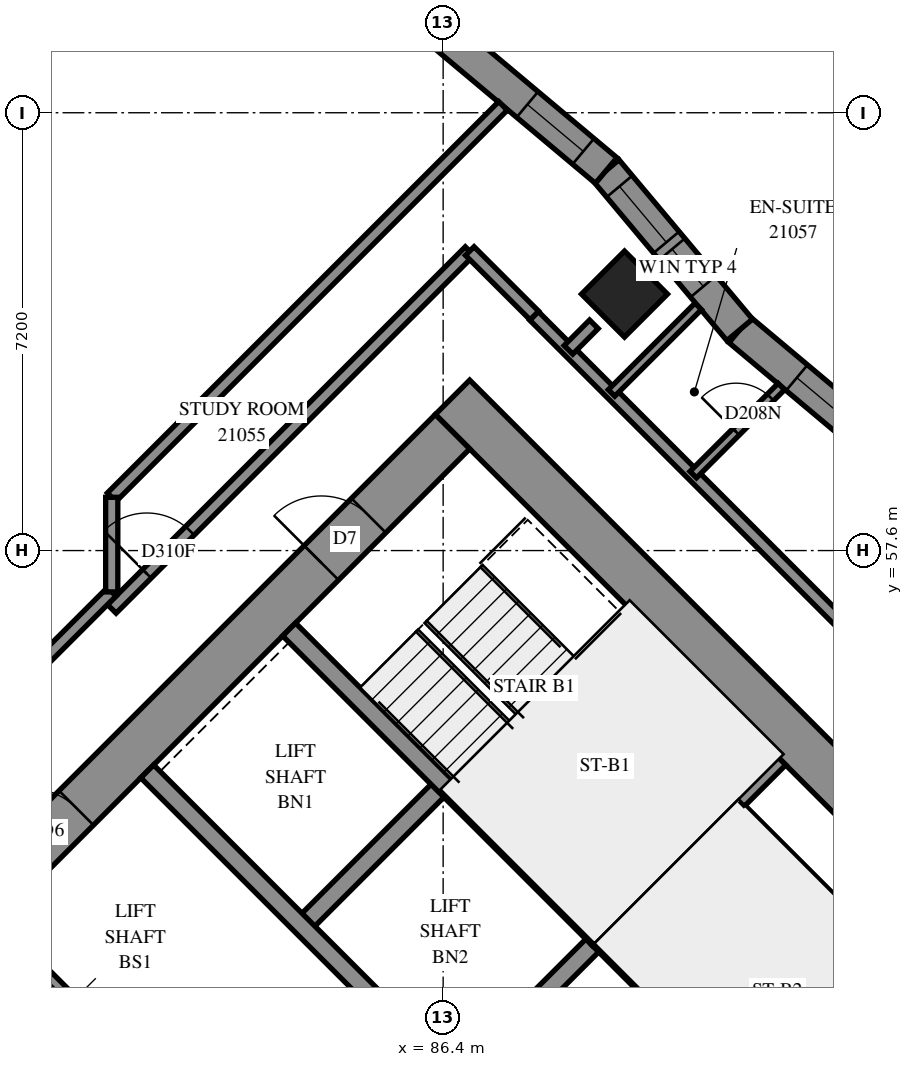
"""IFC4 building model, lengths in metres.
Left out: names, types, materials, properties, quantities, classifications, styles, units other than length and angle.
Written with IfcOpenShell. Run it as: python <this file> out.ifc"""

import sys

from ifc_helpers import new_model, si_unit, direction, frame, frame_2d, origin, origin_2d, place, context, subcontext, project, spatial, polyline, rectangle, outline, extrude, element, fill, save


model = new_model("IFC4")
c1 = context("Model", 3, precision=1e-05, world=origin(), true_north=direction((0.0, 1.0)))
c2 = subcontext(c1, "Body", "Model", "MODEL_VIEW")
j1 = project(units=[si_unit("LENGTHUNIT", "METRE"), si_unit("PLANEANGLEUNIT", "RADIAN")], contexts=[c1])
p1 = place(None, origin())
s1 = spatial("IfcSite", under=j1, at=p1, CompositionType="ELEMENT")
p2 = place(p1, origin())
s2 = spatial("IfcBuilding", under=s1, at=p2, CompositionType="ELEMENT")
p3 = place(p2, frame((0.0, 0.0, 81.2)))
s3 = spatial("IfcBuildingStorey", under=s2, at=p3, CompositionType="ELEMENT", Elevation=81.2)
p4 = place(p3, frame((89.382, 61.818, 0.0), z_axis=(0.0, 0.0, 1.0), x_axis=(0.7071067812, -0.7071067812, 0.0)))
e1 = element("IfcColumn", 1, at=p4, inside=s3, PredefinedType="COLUMN", context=c2, shape_type="SweptSolid", body=[
    extrude(rectangle(XDim=1.0, YDim=1.0, at=origin_2d()), origin(), (0.0, 0.0, 1.0), 3.1),
])
p5 = place(p3, frame((86.554, 60.121, -0.3), z_axis=(0.0, 0.0, 1.0), x_axis=(0.7071067812, -0.7071067812, 0.0)))
e2 = element("IfcWall", 2, at=p5, inside=s3, PredefinedType="SHEAR", context=c2, shape_type="SweptSolid", body=[
    extrude(rectangle(XDim=16.0, YDim=0.8, at=frame_2d((8.0, 0.0))), origin(), (0.0, 0.0, 1.0), 2.7),
])
p6 = place(p5, frame((10.8, 0.0, 0.3)))
e3 = element("IfcOpeningElement", 3, at=p6, cuts=e2, PredefinedType="OPENING", context=c2, shape_type="SweptSolid", body=[
    extrude(rectangle(XDim=0.8, YDim=2.1, at=frame_2d((0.4, 1.05))), frame((0.0, 0.41, 0.0), z_axis=(0.0, -1.0, 0.0), x_axis=(1.0, 0.0, 0.0)), (0.0, 0.0, 1.0), 0.82),
])
p7 = place(p3, frame((76.372, 49.373, -0.3), z_axis=(0.0, 0.0, 1.0), x_axis=(0.7071067812, 0.7071067812, 0.0)))
e4 = element("IfcWall", 4, at=p7, inside=s3, PredefinedType="SHEAR", context=c2, shape_type="SweptSolid", body=[
    extrude(rectangle(XDim=14.4, YDim=0.8, at=frame_2d((7.2, 0.0))), origin(), (0.0, 0.0, 1.0), 2.7),
])
p8 = place(p7, frame((4.55, 0.0, 0.3)))
e5 = element("IfcOpeningElement", 5, at=p8, cuts=e4, PredefinedType="OPENING", context=c2, shape_type="SweptSolid", body=[
    extrude(rectangle(XDim=1.1, YDim=2.1, at=frame_2d((0.55, 1.05))), frame((0.0, 0.41, 0.0), z_axis=(0.0, -1.0, 0.0), x_axis=(1.0, 0.0, 0.0)), (0.0, 0.0, 1.0), 0.82),
])
p9 = place(p7, frame((11.35, 0.0, 0.3)))
e6 = element("IfcOpeningElement", 6, at=p9, cuts=e4, PredefinedType="OPENING", context=c2, shape_type="SweptSolid", body=[
    extrude(rectangle(XDim=1.1, YDim=2.1, at=frame_2d((0.55, 1.05))), frame((0.0, 0.41, 0.0), z_axis=(0.0, -1.0, 0.0), x_axis=(1.0, 0.0, 0.0)), (0.0, 0.0, 1.0), 0.82),
])
p10 = place(p3, frame((84.079, 51.423, 0.0), z_axis=(0.0, 0.0, 1.0), x_axis=(0.7071219326, 0.7070916295, 0.0)))
e7 = element("IfcWall", 7, at=p10, inside=s3, PredefinedType="SOLIDWALL", context=c2, shape_type="SweptSolid", body=[
    extrude(rectangle(XDim=3.3, YDim=0.3, at=frame_2d((1.65, 0.0))), origin(), (0.0, 0.0, 1.0), 3.1),
])
p11 = place(p3, frame((86.625, 48.878, 0.0), z_axis=(0.0, 0.0, 1.0), x_axis=(0.7071067812, 0.7071067812, 0.0)))
e8 = element("IfcWall", 8, at=p11, inside=s3, PredefinedType="SOLIDWALL", context=c2, shape_type="SweptSolid", body=[
    extrude(rectangle(XDim=3.3, YDim=0.3, at=frame_2d((1.65, 0.0))), origin(), (0.0, 0.0, 1.0), 3.1),
])
p12 = place(p3, frame((78.988, 51.423, 0.0), z_axis=(0.0, 0.0, 1.0), x_axis=(0.7071067812, -0.7071067812, 0.0)))
e9 = element("IfcWall", 9, at=p12, inside=s3, PredefinedType="SOLIDWALL", context=c2, shape_type="SweptSolid", body=[
    extrude(rectangle(XDim=14.4, YDim=0.3, at=frame_2d((7.2, 0.0))), origin(), (0.0, 0.0, 1.0), 3.1),
])
p13 = place(p12, frame((1.25, 0.0, 0.0)))
e10 = element("IfcOpeningElement", 10, at=p13, cuts=e9, PredefinedType="OPENING", context=c2, shape_type="SweptSolid", body=[
    extrude(rectangle(XDim=1.1, YDim=2.1, at=frame_2d((0.55, 1.05))), frame((0.0, 0.16, 0.0), z_axis=(0.0, -1.0, 0.0), x_axis=(1.0, 0.0, 0.0)), (0.0, 0.0, 1.0), 0.32),
])
p14 = place(p12, frame((4.85, 0.0, 0.0)))
e11 = element("IfcOpeningElement", 11, at=p14, cuts=e9, PredefinedType="OPENING", context=c2, shape_type="SweptSolid", body=[
    extrude(rectangle(XDim=1.1, YDim=2.1, at=frame_2d((0.55, 1.05))), frame((0.0, 0.16, 0.0), z_axis=(0.0, -1.0, 0.0), x_axis=(1.0, 0.0, 0.0)), (0.0, 0.0, 1.0), 0.32),
])
p15 = place(p12, frame((8.45, 0.0, 0.0)))
e12 = element("IfcOpeningElement", 12, at=p15, cuts=e9, PredefinedType="OPENING", context=c2, shape_type="SweptSolid", body=[
    extrude(rectangle(XDim=1.1, YDim=2.1, at=frame_2d((0.55, 1.05))), frame((0.0, 0.16, 0.0), z_axis=(0.0, -1.0, 0.0), x_axis=(1.0, 0.0, 0.0)), (0.0, 0.0, 1.0), 0.32),
])
p16 = place(p12, frame((12.05, 0.0, 0.0)))
e13 = element("IfcOpeningElement", 13, at=p16, cuts=e9, PredefinedType="OPENING", context=c2, shape_type="SweptSolid", body=[
    extrude(rectangle(XDim=1.1, YDim=2.1, at=frame_2d((0.55, 1.05))), frame((0.0, 0.16, 0.0), z_axis=(0.0, -1.0, 0.0), x_axis=(1.0, 0.0, 0.0)), (0.0, 0.0, 1.0), 0.32),
])
p17 = place(p3, frame((81.534, 53.969, 0.0), z_axis=(0.0, 0.0, 1.0), x_axis=(0.707103309, -0.7071102534, 0.0)))
e14 = element("IfcWall", 14, at=p17, inside=s3, PredefinedType="SOLIDWALL", context=c2, shape_type="SweptSolid", body=[
    extrude(rectangle(XDim=14.4, YDim=0.3, at=frame_2d((7.2, 0.0))), origin(), (0.0, 0.0, 1.0), 3.1),
])
p18 = place(p17, frame((12.05, 0.0, 0.0)))
e15 = element("IfcOpeningElement", 15, at=p18, cuts=e14, PredefinedType="OPENING", context=c2, shape_type="SweptSolid", body=[
    extrude(rectangle(XDim=1.1, YDim=2.1, at=frame_2d((0.55, 1.05))), frame((0.0, 0.16, 0.0), z_axis=(0.0, -1.0, 0.0), x_axis=(1.0, 0.0, 0.0)), (0.0, 0.0, 1.0), 0.32),
])
for number, where, z_axis, x_axis in (
    (16, (83.867, 56.302, 0.0), (0.0, 0.0, 1.0), (0.707, -0.707, 0.0)),
    (17, (88.958, 51.211, 0.0), (0.0, 0.0, 1.0), (0.707, -0.707, 0.0)),
):
    element("IfcWall", number, at=place(p3, frame(where, z_axis=z_axis, x_axis=x_axis)), inside=s3, PredefinedType="SOLIDWALL", context=c2, shape_type="SweptSolid", body=[
        extrude(rectangle(XDim=7.2, YDim=0.3, at=frame_2d((3.6, 0.0))), origin(), (0.0, 0.0, 1.0), 3.1),
    ])
p19 = place(p3, frame((88.958, 51.211, 0.0), z_axis=(0.0, 0.0, 1.0), x_axis=(0.7071067812, 0.7071067812, 0.0)))
e18 = element("IfcWall", 18, at=p19, inside=s3, PredefinedType="SOLIDWALL", context=c2, shape_type="SweptSolid", body=[
    extrude(rectangle(XDim=4.2, YDim=0.3, at=frame_2d((2.1, 0.0))), origin(), (0.0, 0.0, 1.0), 3.1),
])
p20 = place(p3, frame((93.897, 59.034, 0.0), z_axis=(0.0, 0.0, 1.0), x_axis=(-0.7664437954, 0.6423113798, 0.0)))
e19 = element("IfcWall", 19, at=p20, inside=s3, PredefinedType="SOLIDWALL", context=c2, shape_type="SweptSolid", body=[
    extrude(outline(polyline([(-0.024, -0.275), (3.394, -0.275), (3.442, 0.275), (0.024, 0.275), (-0.024, -0.275)])), origin(), (0.0, 0.0, 1.0), 3.1),
])
p21 = place(p20, frame((0.992, 0.0, 0.5)))
e20 = element("IfcOpeningElement", 20, at=p21, cuts=e19, PredefinedType="OPENING", context=c2, shape_type="SweptSolid", body=[
    extrude(rectangle(XDim=1.2, YDim=2.45, at=frame_2d((0.6, 1.225))), frame((0.0, 0.285, 0.0), z_axis=(0.0, -1.0, 0.0), x_axis=(1.0, 0.0, 0.0)), (0.0, 0.0, 1.0), 0.57),
])
p22 = place(p3, frame((91.277, 61.23, 0.0), z_axis=(0.0, 0.0, 1.0), x_axis=(-0.6422969775, 0.7664558648, 0.0)))
e21 = element("IfcWall", 21, at=p22, inside=s3, PredefinedType="SOLIDWALL", context=c2, shape_type="SweptSolid", body=[
    extrude(outline(polyline([(0.024, -0.275), (3.442, -0.275), (3.394, 0.275), (-0.024, 0.275), (0.024, -0.275)])), origin(), (0.0, 0.0, 1.0), 3.1),
])
p23 = place(p22, frame((1.878, 0.0, 0.5)))
e22 = element("IfcOpeningElement", 22, at=p23, cuts=e21, PredefinedType="OPENING", context=c2, shape_type="SweptSolid", body=[
    extrude(rectangle(XDim=1.2, YDim=2.45, at=frame_2d((0.6, 1.225))), frame((0.0, 0.285, 0.0), z_axis=(0.0, -1.0, 0.0), x_axis=(1.0, 0.0, 0.0)), (0.0, 0.0, 1.0), 0.57),
])
p24 = place(p22, frame((0.931, 0.0, 0.45)))
e23 = element("IfcOpeningElement", 23, at=p24, cuts=e21, PredefinedType="OPENING", context=c2, shape_type="SweptSolid", body=[
    extrude(rectangle(XDim=0.8, YDim=2.5, at=frame_2d((0.4, 1.25))), frame((0.0, 0.285, 0.0), z_axis=(0.0, -1.0, 0.0), x_axis=(1.0, 0.0, 0.0)), (0.0, 0.0, 1.0), 0.57),
])
p25 = place(p3, frame((89.081, 63.85, 0.0), z_axis=(0.0, 0.0, 1.0), x_axis=(-0.7664558648, 0.6422969775, 0.0)))
e24 = element("IfcWall", 24, at=p25, inside=s3, PredefinedType="SOLIDWALL", context=c2, shape_type="SweptSolid", body=[
    extrude(outline(polyline([(-0.024, -0.275), (3.394, -0.275), (3.442, 0.275), (0.024, 0.275), (-0.024, -0.275)])), origin(), (0.0, 0.0, 1.0), 3.1),
])
p26 = place(p25, frame((0.491, 0.0, 0.5)))
e25 = element("IfcOpeningElement", 25, at=p26, cuts=e24, PredefinedType="OPENING", context=c2, shape_type="SweptSolid", body=[
    extrude(rectangle(XDim=1.2, YDim=2.45, at=frame_2d((0.6, 1.225))), frame((0.0, 0.285, 0.0), z_axis=(0.0, -1.0, 0.0), x_axis=(1.0, 0.0, 0.0)), (0.0, 0.0, 1.0), 0.57),
])
p27 = place(p3, frame((91.313, 53.354, 0.0), z_axis=(0.0, 0.0, 1.0), x_axis=(0.7071140275, -0.7070995348, 0.0)))
e26 = element("IfcWall", 26, at=p27, inside=s3, PredefinedType="PARTITIONING", context=c2, shape_type="SweptSolid", body=[
    extrude(rectangle(XDim=6.9, YDim=0.15, at=frame_2d((3.45, 0.0))), origin(), (0.0, 0.0, 1.0), 3.1),
])
p28 = place(p3, frame((87.894, 61.461, 0.0), z_axis=(0.0, 0.0, 1.0), x_axis=(0.7071067812, -0.7071067812, 0.0)))
e27 = element("IfcWall", 27, at=p28, inside=s3, PredefinedType="PARTITIONING", context=c2, shape_type="SweptSolid", body=[
    extrude(rectangle(XDim=17.5, YDim=0.2, at=frame_2d((8.75, 0.0))), origin(), (0.0, 0.0, 1.0), 3.1),
])
p29 = place(p28, frame((8.735, 0.0, 0.0)))
e28 = element("IfcOpeningElement", 28, at=p29, cuts=e27, PredefinedType="OPENING", context=c2, shape_type="SweptSolid", body=[
    extrude(rectangle(XDim=0.9, YDim=2.1, at=frame_2d((0.45, 1.05))), frame((0.0, 0.11, 0.0), z_axis=(0.0, -1.0, 0.0), x_axis=(1.0, 0.0, 0.0)), (0.0, 0.0, 1.0), 0.22),
])
p30 = place(p3, frame((80.949, 58.477, 0.0), z_axis=(0.0, 0.0, 1.0), x_axis=(0.7071067812, 0.7071067812, 0.0)))
e29 = element("IfcWall", 29, at=p30, inside=s3, PredefinedType="PARTITIONING", context=c2, shape_type="SweptSolid", body=[
    extrude(rectangle(XDim=9.101, YDim=0.2, at=frame_2d((4.551, 0.0))), origin(), (0.0, 0.0, 1.0), 3.1),
])
p31 = place(p3, frame((80.951, 56.641, 0.0), z_axis=(0.0, 0.0, 1.0), x_axis=(0.7071067812, 0.7071067812, 0.0)))
e30 = element("IfcWall", 30, at=p31, inside=s3, PredefinedType="PARTITIONING", context=c2, shape_type="SweptSolid", body=[
    extrude(rectangle(XDim=8.321, YDim=0.2, at=frame_2d((4.161, 0.0))), origin(), (0.0, 0.0, 1.0), 3.1),
])
p32 = place(p31, frame((0.816, 0.0, 0.0)))
e31 = element("IfcOpeningElement", 31, at=p32, cuts=e30, PredefinedType="OPENING", context=c2, shape_type="SweptSolid", body=[
    extrude(rectangle(XDim=1.0, YDim=2.1, at=frame_2d((0.5, 1.05))), frame((0.0, 0.11, 0.0), z_axis=(0.0, -1.0, 0.0), x_axis=(1.0, 0.0, 0.0)), (0.0, 0.0, 1.0), 0.22),
])
p33 = place(p3, frame((90.513, 58.849, 0.0), z_axis=(0.0, 0.0, 1.0), x_axis=(0.7071311915, 0.70708237, 0.0)))
e32 = element("IfcWall", 32, at=p33, inside=s3, PredefinedType="PARTITIONING", context=c2, shape_type="SweptSolid", body=[
    extrude(rectangle(XDim=2.048, YDim=0.15, at=frame_2d((1.024, 0.0))), origin(), (0.0, 0.0, 1.0), 3.1),
])
p34 = place(p33, frame((0.996, 0.0, 0.0)))
e33 = element("IfcOpeningElement", 33, at=p34, cuts=e32, PredefinedType="OPENING", context=c2, shape_type="SweptSolid", body=[
    extrude(rectangle(XDim=0.8, YDim=2.1, at=frame_2d((0.4, 1.05))), frame((0.0, 0.085, 0.0), z_axis=(0.0, -1.0, 0.0), x_axis=(1.0, 0.0, 0.0)), (0.0, 0.0, 1.0), 0.17),
])
p35 = place(p3, frame((89.169, 60.193, 0.0), z_axis=(0.0, 0.0, 1.0), x_axis=(0.7076279259, 0.7065852521, 0.0)))
e34 = element("IfcWall", 34, at=p35, inside=s3, PredefinedType="PARTITIONING", context=c2, shape_type="SweptSolid", body=[
    extrude(rectangle(XDim=2.014, YDim=0.15, at=frame_2d((1.007, 0.0))), origin(), (0.0, 0.0, 1.0), 3.1),
])
p36 = place(p3, frame((79.801, 55.773, 0.0), z_axis=(0.0, 0.0, 1.0), x_axis=(0.7071067812, 0.7071067812, 0.0)))
e35 = element("IfcWall", 35, at=p36, inside=s3, PredefinedType="PARTITIONING", context=c2, shape_type="SweptSolid", body=[
    extrude(rectangle(XDim=1.623, YDim=0.2, at=frame_2d((0.812, 0.0))), origin(), (0.0, 0.0, 1.0), 3.1),
])
p37 = place(p3, frame((80.95, 56.92, 0.0), z_axis=(0.0, 0.0, 1.0), x_axis=(0.0, 1.0, 0.0)))
e36 = element("IfcWall", 36, at=p37, inside=s3, PredefinedType="PARTITIONING", context=c2, shape_type="SweptSolid", body=[
    extrude(rectangle(XDim=1.556, YDim=0.2, at=frame_2d((0.778, 0.0))), origin(), (0.0, 0.0, 1.0), 3.1),
])
p38 = place(p3, frame((86.838, 62.526, 0.0), z_axis=(0.0, 0.0, 1.0), x_axis=(0.70777292, -0.7064400143, 0.0)))
e37 = element("IfcWall", 37, at=p38, inside=s3, PredefinedType="PARTITIONING", context=c2, shape_type="SweptSolid", body=[
    extrude(rectangle(XDim=1.5, YDim=0.2, at=frame_2d((0.75, 0.0))), origin(), (0.0, 0.0, 1.0), 3.1),
])
p39 = place(p3, frame((88.461, 60.901, 0.0), z_axis=(0.0, 0.0, 1.0), x_axis=(0.7054171665, 0.7087923682, 0.0)))
e38 = element("IfcWall", 38, at=p39, inside=s3, PredefinedType="PARTITIONING", context=c2, shape_type="SweptSolid", body=[
    extrude(rectangle(XDim=0.593, YDim=0.2, at=frame_2d((0.296, 0.0))), origin(), (0.0, 0.0, 1.0), 3.1),
])
p40 = place(p21, origin())
e39 = element("IfcWindow", 39, at=p40, inside=s3, PartitioningType="SINGLE_PANEL", PredefinedType="WINDOW", context=c2, shape_type="SweptSolid", body=[
    extrude(rectangle(XDim=1.2, YDim=2.45, at=frame_2d((0.6, 1.225))), frame((0.0, 0.155, 0.0), z_axis=(0.0, -1.0, 0.0), x_axis=(1.0, 0.0, 0.0)), (0.0, 0.0, 1.0), 0.06),
])
fill(e20, e39)
p41 = place(p23, origin())
e40 = element("IfcWindow", 40, at=p41, inside=s3, PartitioningType="SINGLE_PANEL", PredefinedType="WINDOW", context=c2, shape_type="SweptSolid", body=[
    extrude(rectangle(XDim=1.2, YDim=2.45, at=frame_2d((0.6, 1.225))), frame((0.0, 0.155, 0.0), z_axis=(0.0, -1.0, 0.0), x_axis=(1.0, 0.0, 0.0)), (0.0, 0.0, 1.0), 0.06),
])
fill(e22, e40)
p42 = place(p26, origin())
e41 = element("IfcWindow", 41, at=p42, inside=s3, PartitioningType="SINGLE_PANEL", PredefinedType="WINDOW", context=c2, shape_type="SweptSolid", body=[
    extrude(rectangle(XDim=1.2, YDim=2.45, at=frame_2d((0.6, 1.225))), frame((0.0, 0.155, 0.0), z_axis=(0.0, -1.0, 0.0), x_axis=(1.0, 0.0, 0.0)), (0.0, 0.0, 1.0), 0.06),
])
fill(e25, e41)
p43 = place(p8, origin())
e42 = element("IfcDoor", 42, at=p43, inside=s3, OperationType="DOUBLE_DOOR_SINGLE_SWING", PredefinedType="DOOR", context=c2, shape_type="SweptSolid", body=[
    extrude(rectangle(XDim=1.1, YDim=2.1, at=frame_2d((0.55, 1.05))), frame((0.0, 0.025, 0.0), z_axis=(0.0, -1.0, 0.0), x_axis=(1.0, 0.0, 0.0)), (0.0, 0.0, 1.0), 0.05),
])
fill(e5, e42)
p44 = place(p9, origin())
e43 = element("IfcDoor", 43, at=p44, inside=s3, OperationType="SINGLE_SWING_LEFT", PredefinedType="DOOR", context=c2, shape_type="SweptSolid", body=[
    extrude(rectangle(XDim=1.1, YDim=2.1, at=frame_2d((0.55, 1.05))), frame((0.0, 0.025, 0.0), z_axis=(0.0, -1.0, 0.0), x_axis=(1.0, 0.0, 0.0)), (0.0, 0.0, 1.0), 0.05),
])
fill(e6, e43)
p45 = place(p13, origin())
e44 = element("IfcDoor", 44, at=p45, inside=s3, OperationType="SLIDING_TO_LEFT", PredefinedType="DOOR", context=c2, shape_type="SweptSolid", body=[
    extrude(rectangle(XDim=1.1, YDim=2.1, at=frame_2d((0.55, 1.05))), frame((0.0, 0.025, 0.0), z_axis=(0.0, -1.0, 0.0), x_axis=(1.0, 0.0, 0.0)), (0.0, 0.0, 1.0), 0.05),
])
fill(e10, e44)
p46 = place(p32, origin())
e45 = element("IfcDoor", 45, at=p46, inside=s3, OperationType="SINGLE_SWING_RIGHT", PredefinedType="DOOR", context=c2, shape_type="SweptSolid", body=[
    extrude(rectangle(XDim=1.0, YDim=2.1, at=frame_2d((0.5, 1.05))), frame((0.0, 0.025, 0.0), z_axis=(0.0, -1.0, 0.0), x_axis=(1.0, 0.0, 0.0)), (0.0, 0.0, 1.0), 0.05),
])
fill(e31, e45)
p47 = place(p34, origin())
e46 = element("IfcDoor", 46, at=p47, inside=s3, OperationType="SINGLE_SWING_RIGHT", PredefinedType="DOOR", context=c2, shape_type="SweptSolid", body=[
    extrude(rectangle(XDim=0.8, YDim=2.1, at=frame_2d((0.4, 1.05))), frame((0.0, 0.025, 0.0), z_axis=(0.0, -1.0, 0.0), x_axis=(1.0, 0.0, 0.0)), (0.0, 0.0, 1.0), 0.05),
])
fill(e33, e46)
p48 = place(p24, origin())
e47 = element("IfcWindow", 47, at=p48, inside=s3, PartitioningType="SINGLE_PANEL", PredefinedType="WINDOW", context=c2, shape_type="SweptSolid", body=[
    extrude(rectangle(XDim=0.8, YDim=2.5, at=frame_2d((0.4, 1.25))), frame((0.0, 0.155, 0.0), z_axis=(0.0, -1.0, 0.0), x_axis=(1.0, 0.0, 0.0)), (0.0, 0.0, 1.0), 0.06),
])
fill(e23, e47)
save(model, sys.argv[1])
